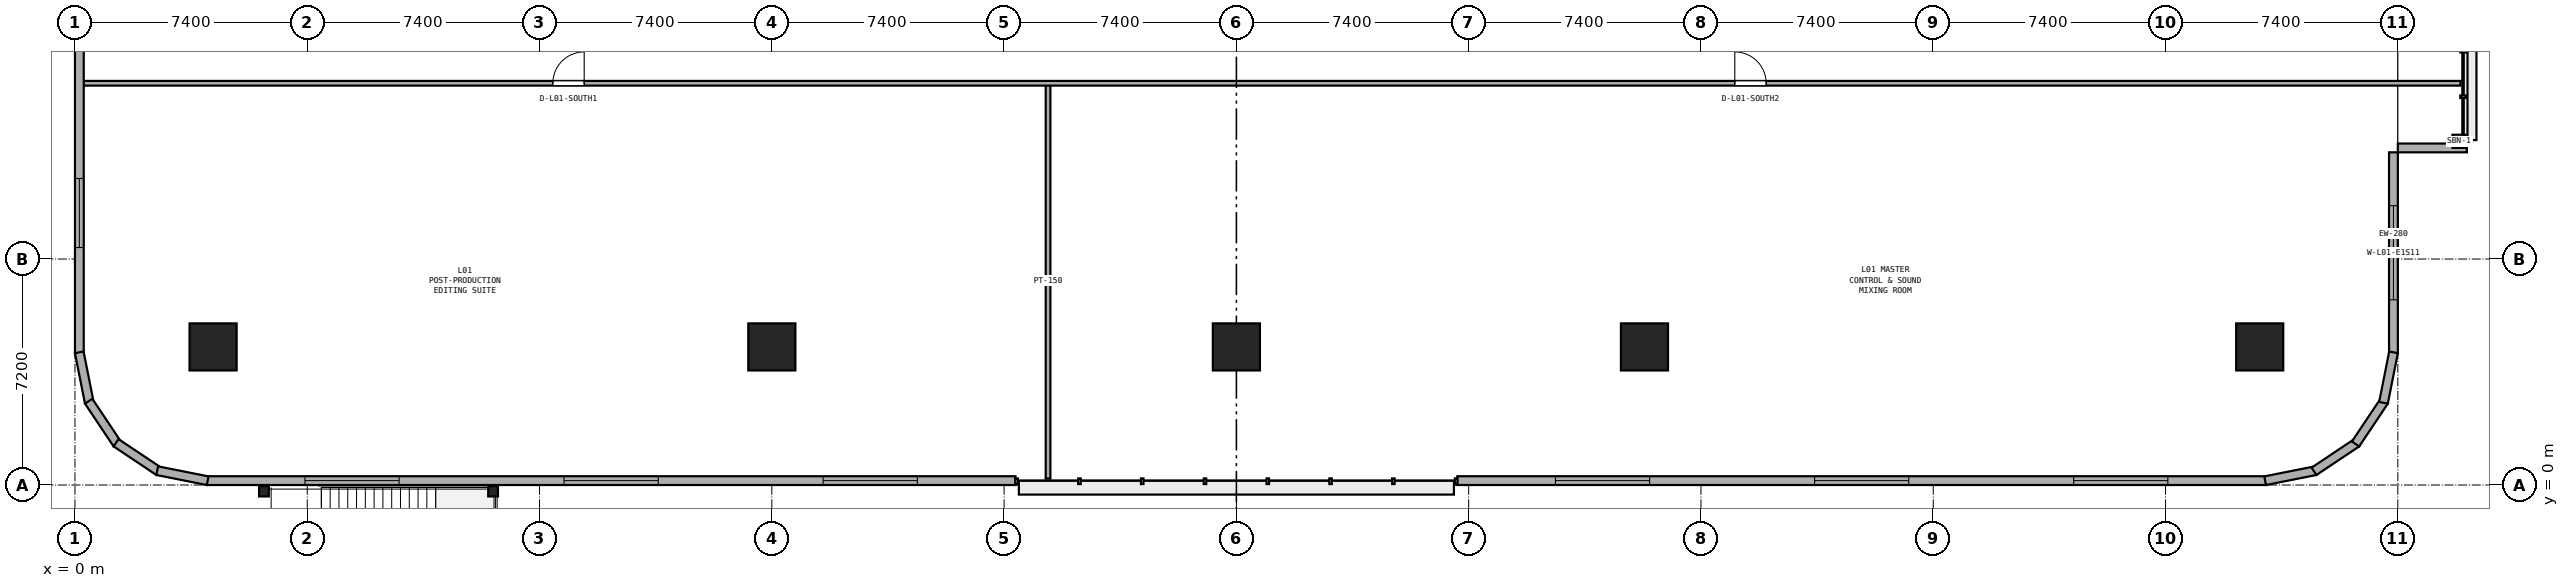
"""IFC4 building model, lengths in metres.
Left out: names, types, materials, properties, quantities, classifications, styles, units other than length and angle.
Written with IfcOpenShell. Run it as: python <this file> out.ifc"""

import sys

from ifc_helpers import new_model, si_unit, direction, frame, frame_2d, origin, origin_2d, place, context, subcontext, project, spatial, rectangle, i_section, extrude, element, fill, save


model = new_model("IFC4")
c1 = context("Model", 3, precision=1e-05, world=origin(), true_north=direction((0.0, 1.0)))
c2 = subcontext(c1, "Body", "Model", "MODEL_VIEW")
j1 = project(units=[si_unit("LENGTHUNIT", "METRE"), si_unit("PLANEANGLEUNIT", "RADIAN")], contexts=[c1])
p1 = place(None, origin())
s1 = spatial("IfcSite", under=j1, at=p1, CompositionType="ELEMENT")
p2 = place(p1, origin())
s2 = spatial("IfcBuilding", under=s1, at=p2, CompositionType="ELEMENT")
p3 = place(p2, frame((0.0, 0.0, 5.0)))
s3 = spatial("IfcBuildingStorey", under=s2, at=p3, CompositionType="ELEMENT", Elevation=5.0)
for number, where, z_axis, x_axis in (
    (1, (4.4, 4.4, 0.0), (0.0, 0.0, 1.0), (1.0, 0.0, 0.0)),
    (2, (22.2, 4.4, 0.0), (0.0, 0.0, 1.0), (1.0, 0.0, 0.0)),
    (3, (37.0, 4.4, 0.0), (0.0, 0.0, 1.0), (1.0, 0.0, 0.0)),
    (4, (50.0, 4.4, 0.0), (0.0, 0.0, 1.0), (1.0, 0.0, 0.0)),
    (5, (69.6, 4.4, 0.0), (0.0, 0.0, 1.0), (1.0, 0.0, 0.0)),
):
    element("IfcColumn", number, at=place(p3, frame(where, z_axis=z_axis, x_axis=x_axis)), inside=s3, PredefinedType="COLUMN", context=c2, shape_type="SweptSolid", body=[
        extrude(rectangle(XDim=1.5, YDim=1.5, at=origin_2d()), origin(), (0.0, 0.0, 1.0), 5.0),
    ])
for number, where, z_axis, x_axis in (
    (6, (6.02, -0.2, 0.0), (0.0, 0.0, 1.0), (1.0, 0.0, 0.0)),
    (7, (13.32, -0.2, 0.0), (0.0, 0.0, 1.0), (1.0, 0.0, 0.0)),
):
    element("IfcColumn", number, at=place(p3, frame(where, z_axis=z_axis, x_axis=x_axis)), inside=s3, PredefinedType="COLUMN", context=c2, shape_type="SweptSolid", body=[
        extrude(i_section(OverallWidth=0.311, OverallDepth=0.327, WebThickness=0.016, FlangeThickness=0.025, at=origin_2d()), origin(), (0.0, 0.0, 1.0), 5.0),
    ])
p4 = place(p3, frame((31.0, 0.205, 0.0), z_axis=(0.0, 0.0, 1.0), x_axis=(0.0, 1.0, 0.0)))
e8 = element("IfcWall", 8, at=p4, inside=s3, PredefinedType="PARTITIONING", context=c2, shape_type="SweptSolid", body=[
    extrude(rectangle(XDim=12.595, YDim=0.15, at=frame_2d((6.297, 0.0))), origin(), (0.0, 0.0, 1.0), 4.66),
])
p5 = place(p3, frame((0.205, 12.8, 0.0), z_axis=(0.0, 0.0, 1.0), x_axis=(1.0, 0.0, 0.0)))
e9 = element("IfcWall", 9, at=p5, inside=s3, PredefinedType="PARTITIONING", context=c2, shape_type="SweptSolid", body=[
    extrude(rectangle(XDim=75.79, YDim=0.15, at=frame_2d((37.895, 0.0))), origin(), (0.0, 0.0, 1.0), 4.66),
])
p6 = place(p5, frame((15.018, 0.0, 0.0)))
e10 = element("IfcOpeningElement", 10, at=p6, cuts=e9, PredefinedType="OPENING", context=c2, shape_type="SweptSolid", body=[
    extrude(rectangle(XDim=1.0, YDim=2.12, at=frame_2d((0.5, 1.06))), frame((0.0, 0.085, 0.0), z_axis=(0.0, -1.0, 0.0), x_axis=(1.0, 0.0, 0.0)), (0.0, 0.0, 1.0), 0.17),
])
p7 = place(p5, frame((52.673, 0.0, 0.0)))
e11 = element("IfcOpeningElement", 11, at=p7, cuts=e9, PredefinedType="OPENING", context=c2, shape_type="SweptSolid", body=[
    extrude(rectangle(XDim=1.0, YDim=2.12, at=frame_2d((0.5, 1.06))), frame((0.0, 0.085, 0.0), z_axis=(0.0, -1.0, 0.0), x_axis=(1.0, 0.0, 0.0)), (0.0, 0.0, 1.0), 0.17),
])
p8 = place(p3, frame((73.86, 4.2, 0.0), z_axis=(0.0, 0.0, 1.0), x_axis=(0.0, 1.0, 0.0)))
e12 = element("IfcWall", 12, at=p8, inside=s3, PredefinedType="STANDARD", context=c2, shape_type="SweptSolid", body=[
    extrude(rectangle(XDim=6.4, YDim=0.28, at=frame_2d((3.2, 0.0))), origin(), (0.0, 0.0, 1.0), 3.76),
])
p9 = place(p8, frame((1.7, 0.0, 0.9)))
e13 = element("IfcOpeningElement", 13, at=p9, cuts=e12, PredefinedType="OPENING", context=c2, shape_type="SweptSolid", body=[
    extrude(rectangle(XDim=3.0, YDim=2.2, at=frame_2d((1.5, 1.1))), frame((0.0, 0.15, 0.0), z_axis=(0.0, -1.0, 0.0), x_axis=(1.0, 0.0, 0.0)), (0.0, 0.0, 1.0), 0.3),
])
p10 = place(p3, frame((0.14, 29.0, 0.0), z_axis=(0.0, 0.0, 1.0), x_axis=(0.0, -1.0, 0.0)))
e14 = element("IfcWall", 14, at=p10, inside=s3, PredefinedType="STANDARD", context=c2, shape_type="SweptSolid", body=[
    extrude(rectangle(XDim=24.8, YDim=0.28, at=frame_2d((12.4, 0.0))), origin(), (0.0, 0.0, 1.0), 3.76),
])
p11 = place(p10, frame((3.367, 0.0, 0.9)))
e15 = element("IfcOpeningElement", 15, at=p11, cuts=e14, PredefinedType="OPENING", context=c2, shape_type="SweptSolid", body=[
    extrude(rectangle(XDim=2.2, YDim=1.95, at=frame_2d((1.1, 0.975))), frame((0.0, 0.15, 0.0), z_axis=(0.0, -1.0, 0.0), x_axis=(1.0, 0.0, 0.0)), (0.0, 0.0, 1.0), 0.3),
])
p12 = place(p10, frame((19.233, 0.0, 0.9)))
e16 = element("IfcOpeningElement", 16, at=p12, cuts=e14, PredefinedType="OPENING", context=c2, shape_type="SweptSolid", body=[
    extrude(rectangle(XDim=2.2, YDim=1.95, at=frame_2d((1.1, 0.975))), frame((0.0, 0.15, 0.0), z_axis=(0.0, -1.0, 0.0), x_axis=(1.0, 0.0, 0.0)), (0.0, 0.0, 1.0), 0.3),
])
p13 = place(p3, frame((4.2, 0.14, 0.0), z_axis=(0.0, 0.0, 1.0), x_axis=(1.0, 0.0, 0.0)))
e17 = element("IfcWall", 17, at=p13, inside=s3, PredefinedType="STANDARD", context=c2, shape_type="SweptSolid", body=[
    extrude(rectangle(XDim=25.762, YDim=0.28, at=frame_2d((12.881, 0.0))), origin(), (0.0, 0.0, 1.0), 4.66),
])
p14 = place(p13, frame((3.127, 0.0, 0.9)))
e18 = element("IfcOpeningElement", 18, at=p14, cuts=e17, PredefinedType="OPENING", context=c2, shape_type="SweptSolid", body=[
    extrude(rectangle(XDim=3.0, YDim=2.2, at=frame_2d((1.5, 1.1))), frame((0.0, 0.15, 0.0), z_axis=(0.0, -1.0, 0.0), x_axis=(1.0, 0.0, 0.0)), (0.0, 0.0, 1.0), 0.3),
])
p15 = place(p13, frame((11.381, 0.0, 0.9)))
e19 = element("IfcOpeningElement", 19, at=p15, cuts=e17, PredefinedType="OPENING", context=c2, shape_type="SweptSolid", body=[
    extrude(rectangle(XDim=3.0, YDim=2.2, at=frame_2d((1.5, 1.1))), frame((0.0, 0.15, 0.0), z_axis=(0.0, -1.0, 0.0), x_axis=(1.0, 0.0, 0.0)), (0.0, 0.0, 1.0), 0.3),
])
p16 = place(p13, frame((19.635, 0.0, 0.9)))
e20 = element("IfcOpeningElement", 20, at=p16, cuts=e17, PredefinedType="OPENING", context=c2, shape_type="SweptSolid", body=[
    extrude(rectangle(XDim=3.0, YDim=2.2, at=frame_2d((1.5, 1.1))), frame((0.0, 0.15, 0.0), z_axis=(0.0, -1.0, 0.0), x_axis=(1.0, 0.0, 0.0)), (0.0, 0.0, 1.0), 0.3),
])
p17 = place(p3, frame((44.038, 0.14, 0.0), z_axis=(0.0, 0.0, 1.0), x_axis=(1.0, 0.0, 0.0)))
e21 = element("IfcWall", 21, at=p17, inside=s3, PredefinedType="STANDARD", context=c2, shape_type="SweptSolid", body=[
    extrude(rectangle(XDim=25.762, YDim=0.28, at=frame_2d((12.881, 0.0))), origin(), (0.0, 0.0, 1.0), 4.66),
])
p18 = place(p17, frame((3.127, 0.0, 0.9)))
e22 = element("IfcOpeningElement", 22, at=p18, cuts=e21, PredefinedType="OPENING", context=c2, shape_type="SweptSolid", body=[
    extrude(rectangle(XDim=3.0, YDim=2.2, at=frame_2d((1.5, 1.1))), frame((0.0, 0.15, 0.0), z_axis=(0.0, -1.0, 0.0), x_axis=(1.0, 0.0, 0.0)), (0.0, 0.0, 1.0), 0.3),
])
p19 = place(p17, frame((11.381, 0.0, 0.9)))
e23 = element("IfcOpeningElement", 23, at=p19, cuts=e21, PredefinedType="OPENING", context=c2, shape_type="SweptSolid", body=[
    extrude(rectangle(XDim=3.0, YDim=2.2, at=frame_2d((1.5, 1.1))), frame((0.0, 0.15, 0.0), z_axis=(0.0, -1.0, 0.0), x_axis=(1.0, 0.0, 0.0)), (0.0, 0.0, 1.0), 0.3),
])
p20 = place(p17, frame((19.635, 0.0, 0.9)))
e24 = element("IfcOpeningElement", 24, at=p20, cuts=e21, PredefinedType="OPENING", context=c2, shape_type="SweptSolid", body=[
    extrude(rectangle(XDim=3.0, YDim=2.2, at=frame_2d((1.5, 1.1))), frame((0.0, 0.15, 0.0), z_axis=(0.0, -1.0, 0.0), x_axis=(1.0, 0.0, 0.0)), (0.0, 0.0, 1.0), 0.3),
])
for number, where, z_axis, x_axis in (
    (25, (0.137, 4.227, 0.0), (0.0, 0.0, 1.0), (0.195, -0.981, 0.0)),
    (26, (0.436, 2.67, 0.0), (0.0, 0.0, 1.0), (0.556, -0.831, 0.0)),
    (27, (1.308, 1.347, 0.0), (0.0, 0.0, 1.0), (0.831, -0.556, 0.0)),
    (28, (2.62, 0.457, 0.0), (0.0, 0.0, 1.0), (0.981, -0.195, 0.0)),
    (29, (69.773, 0.137, 0.0), (0.0, 0.0, 1.0), (0.981, 0.195, 0.0)),
    (30, (71.33, 0.436, 0.0), (0.0, 0.0, 1.0), (0.831, 0.556, 0.0)),
    (31, (72.653, 1.308, 0.0), (0.0, 0.0, 1.0), (0.556, 0.831, 0.0)),
    (32, (73.543, 2.62, 0.0), (0.0, 0.0, 1.0), (0.195, 0.981, 0.0)),
):
    element("IfcWall", number, at=place(p3, frame(where, z_axis=z_axis, x_axis=x_axis)), inside=s3, PredefinedType="STANDARD", context=c2, shape_type="SweptSolid", body=[
        extrude(rectangle(XDim=1.639, YDim=0.28, at=frame_2d((0.819, 0.0))), origin(), (0.0, 0.0, 1.0), 4.66),
    ])
p21 = place(p3, frame((74.0, 10.74, 0.0), z_axis=(0.0, 0.0, 1.0), x_axis=(1.0, 0.0, 0.0)))
e33 = element("IfcWall", 33, at=p21, inside=s3, PredefinedType="STANDARD", context=c2, shape_type="SweptSolid", body=[
    extrude(rectangle(XDim=2.2, YDim=0.28, at=frame_2d((1.1, 0.0))), origin(), (0.0, 0.0, 1.0), 3.967),
])
p22 = place(p6, origin())
e34 = element("IfcDoor", 34, at=p22, inside=s3, OperationType="SINGLE_SWING_RIGHT", PredefinedType="DOOR", context=c2, shape_type="SweptSolid", body=[
    extrude(rectangle(XDim=1.0, YDim=2.12, at=frame_2d((0.5, 1.06))), frame((0.0, 0.025, 0.0), z_axis=(0.0, -1.0, 0.0), x_axis=(1.0, 0.0, 0.0)), (0.0, 0.0, 1.0), 0.05),
])
fill(e10, e34)
p23 = place(p7, origin())
e35 = element("IfcDoor", 35, at=p23, inside=s3, OperationType="SINGLE_SWING_LEFT", PredefinedType="DOOR", context=c2, shape_type="SweptSolid", body=[
    extrude(rectangle(XDim=1.0, YDim=2.12, at=frame_2d((0.5, 1.06))), frame((0.0, 0.025, 0.0), z_axis=(0.0, -1.0, 0.0), x_axis=(1.0, 0.0, 0.0)), (0.0, 0.0, 1.0), 0.05),
])
fill(e11, e35)
p24 = place(p9, origin())
e36 = element("IfcWindow", 36, at=p24, inside=s3, PartitioningType="SINGLE_PANEL", PredefinedType="WINDOW", context=c2, shape_type="SweptSolid", body=[
    extrude(rectangle(XDim=3.0, YDim=2.2, at=frame_2d((1.5, 1.1))), frame((0.0, 0.03, 0.0), z_axis=(0.0, -1.0, 0.0), x_axis=(1.0, 0.0, 0.0)), (0.0, 0.0, 1.0), 0.06),
])
fill(e13, e36)
p25 = place(p12, origin())
e37 = element("IfcWindow", 37, at=p25, inside=s3, PartitioningType="SINGLE_PANEL", PredefinedType="WINDOW", context=c2, shape_type="SweptSolid", body=[
    extrude(rectangle(XDim=2.2, YDim=1.95, at=frame_2d((1.1, 0.975))), frame((0.0, 0.03, 0.0), z_axis=(0.0, -1.0, 0.0), x_axis=(1.0, 0.0, 0.0)), (0.0, 0.0, 1.0), 0.06),
])
fill(e16, e37)
p26 = place(p14, origin())
e38 = element("IfcWindow", 38, at=p26, inside=s3, PartitioningType="SINGLE_PANEL", PredefinedType="WINDOW", context=c2, shape_type="SweptSolid", body=[
    extrude(rectangle(XDim=3.0, YDim=2.2, at=frame_2d((1.5, 1.1))), frame((0.0, 0.03, 0.0), z_axis=(0.0, -1.0, 0.0), x_axis=(1.0, 0.0, 0.0)), (0.0, 0.0, 1.0), 0.06),
])
fill(e18, e38)
p27 = place(p15, origin())
e39 = element("IfcWindow", 39, at=p27, inside=s3, PartitioningType="SINGLE_PANEL", PredefinedType="WINDOW", context=c2, shape_type="SweptSolid", body=[
    extrude(rectangle(XDim=3.0, YDim=2.2, at=frame_2d((1.5, 1.1))), frame((0.0, 0.03, 0.0), z_axis=(0.0, -1.0, 0.0), x_axis=(1.0, 0.0, 0.0)), (0.0, 0.0, 1.0), 0.06),
])
fill(e19, e39)
p28 = place(p16, origin())
e40 = element("IfcWindow", 40, at=p28, inside=s3, PartitioningType="SINGLE_PANEL", PredefinedType="WINDOW", context=c2, shape_type="SweptSolid", body=[
    extrude(rectangle(XDim=3.0, YDim=2.2, at=frame_2d((1.5, 1.1))), frame((0.0, 0.03, 0.0), z_axis=(0.0, -1.0, 0.0), x_axis=(1.0, 0.0, 0.0)), (0.0, 0.0, 1.0), 0.06),
])
fill(e20, e40)
p29 = place(p18, origin())
e41 = element("IfcWindow", 41, at=p29, inside=s3, PartitioningType="SINGLE_PANEL", PredefinedType="WINDOW", context=c2, shape_type="SweptSolid", body=[
    extrude(rectangle(XDim=3.0, YDim=2.2, at=frame_2d((1.5, 1.1))), frame((0.0, 0.03, 0.0), z_axis=(0.0, -1.0, 0.0), x_axis=(1.0, 0.0, 0.0)), (0.0, 0.0, 1.0), 0.06),
])
fill(e22, e41)
p30 = place(p19, origin())
e42 = element("IfcWindow", 42, at=p30, inside=s3, PartitioningType="SINGLE_PANEL", PredefinedType="WINDOW", context=c2, shape_type="SweptSolid", body=[
    extrude(rectangle(XDim=3.0, YDim=2.2, at=frame_2d((1.5, 1.1))), frame((0.0, 0.03, 0.0), z_axis=(0.0, -1.0, 0.0), x_axis=(1.0, 0.0, 0.0)), (0.0, 0.0, 1.0), 0.06),
])
fill(e23, e42)
p31 = place(p20, origin())
e43 = element("IfcWindow", 43, at=p31, inside=s3, PartitioningType="SINGLE_PANEL", PredefinedType="WINDOW", context=c2, shape_type="SweptSolid", body=[
    extrude(rectangle(XDim=3.0, YDim=2.2, at=frame_2d((1.5, 1.1))), frame((0.0, 0.03, 0.0), z_axis=(0.0, -1.0, 0.0), x_axis=(1.0, 0.0, 0.0)), (0.0, 0.0, 1.0), 0.06),
])
fill(e24, e43)
save(model, sys.argv[1])
